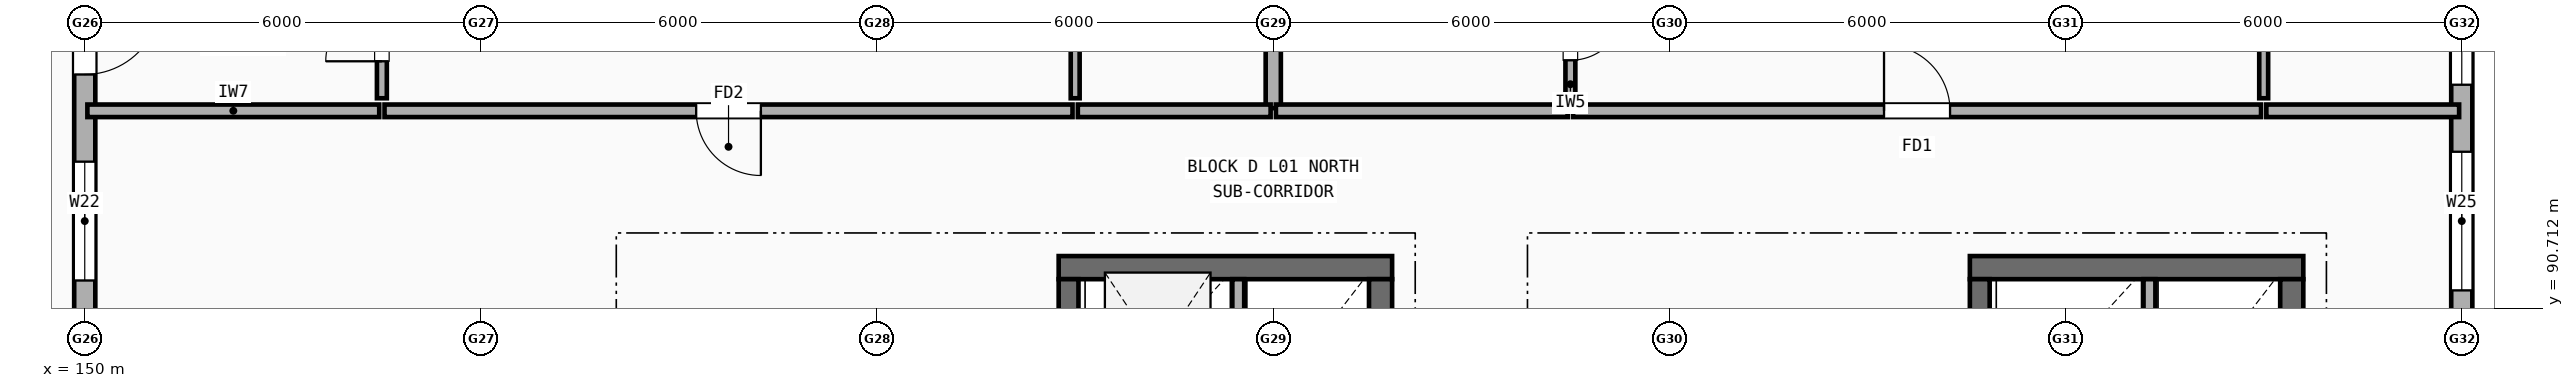
"""IFC4 building model, lengths in metres.
Left out: names, types, materials, properties, quantities, classifications, styles, units other than length and angle.
Written with IfcOpenShell. Run it as: python <this file> out.ifc"""

import sys

from ifc_helpers import new_model, si_unit, direction, frame, frame_2d, origin, place, context, subcontext, project, spatial, rectangle, extrude, element, fill, save


model = new_model("IFC4")
c1 = context("Model", 3, precision=1e-05, world=origin(), true_north=direction((0.0, 1.0)))
c2 = subcontext(c1, "Body", "Model", "MODEL_VIEW")
j1 = project(units=[si_unit("LENGTHUNIT", "METRE"), si_unit("PLANEANGLEUNIT", "RADIAN")], contexts=[c1])
p1 = place(None, origin())
s1 = spatial("IfcSite", under=j1, at=p1, CompositionType="ELEMENT")
p2 = place(p1, origin())
s2 = spatial("IfcBuilding", under=s1, at=p2, CompositionType="ELEMENT")
p3 = place(p2, frame((0.0, 0.0, 4.5)))
s3 = spatial("IfcBuildingStorey", under=s2, at=p3, CompositionType="ELEMENT", Elevation=4.5)
p4 = place(p3, frame((186.0, 90.4, 0.0), z_axis=(0.0, 0.0, 1.0), x_axis=(0.0, 1.0, 0.0)))
e1 = element("IfcWall", 1, at=p4, inside=s3, PredefinedType="STANDARD", context=c2, shape_type="SweptSolid", body=[
    extrude(rectangle(XDim=5.2, YDim=0.32, at=frame_2d((2.6, 0.0))), origin(), (0.0, 0.0, 1.0), 2.945),
])
p5 = place(p4, frame((0.58, 0.0, 0.9)))
e2 = element("IfcOpeningElement", 2, at=p5, cuts=e1, PredefinedType="OPENING", context=c2, shape_type="SweptSolid", body=[
    extrude(rectangle(XDim=2.1, YDim=1.55, at=frame_2d((1.05, 0.775))), frame((0.0, 0.17, 0.0), z_axis=(0.0, -1.0, 0.0), x_axis=(1.0, 0.0, 0.0)), (0.0, 0.0, 1.0), 0.34),
])
p6 = place(p4, frame((3.695, 0.0, 0.9)))
e3 = element("IfcOpeningElement", 3, at=p6, cuts=e1, PredefinedType="OPENING", context=c2, shape_type="SweptSolid", body=[
    extrude(rectangle(XDim=1.15, YDim=1.45, at=frame_2d((0.575, 0.725))), frame((0.0, 0.17, 0.0), z_axis=(0.0, -1.0, 0.0), x_axis=(1.0, 0.0, 0.0)), (0.0, 0.0, 1.0), 0.34),
])
p7 = place(p3, frame((150.0, 95.6, 0.0), z_axis=(0.0, 0.0, 1.0), x_axis=(0.0, -1.0, 0.0)))
e4 = element("IfcWall", 4, at=p7, inside=s3, PredefinedType="STANDARD", context=c2, shape_type="SweptSolid", body=[
    extrude(rectangle(XDim=5.2, YDim=0.32, at=frame_2d((2.6, 0.0))), origin(), (0.0, 0.0, 1.0), 2.945),
])
p8 = place(p7, frame((0.2, 0.0, 0.0)))
e5 = element("IfcOpeningElement", 5, at=p8, cuts=e4, PredefinedType="OPENING", context=c2, shape_type="SweptSolid", body=[
    extrude(rectangle(XDim=1.15, YDim=2.15, at=frame_2d((0.575, 1.075))), frame((0.0, 0.17, 0.0), z_axis=(0.0, -1.0, 0.0), x_axis=(1.0, 0.0, 0.0)), (0.0, 0.0, 1.0), 0.34),
])
p9 = place(p7, frame((2.67, 0.0, 0.9)))
e6 = element("IfcOpeningElement", 6, at=p9, cuts=e4, PredefinedType="OPENING", context=c2, shape_type="SweptSolid", body=[
    extrude(rectangle(XDim=1.8, YDim=1.45, at=frame_2d((0.9, 0.725))), frame((0.0, 0.17, 0.0), z_axis=(0.0, -1.0, 0.0), x_axis=(1.0, 0.0, 0.0)), (0.0, 0.0, 1.0), 0.34),
])
p10 = place(p3, frame((169.8, 91.325, 0.0), z_axis=(0.0, 0.0, 1.0), x_axis=(-1.0, 0.0, 0.0)))
e7 = element("IfcWall", 7, at=p10, inside=s3, PredefinedType="SHEAR", context=c2, shape_type="SweptSolid", body=[
    extrude(rectangle(XDim=5.05, YDim=0.35, at=frame_2d((2.525, 0.0))), origin(), (0.0, 0.0, 1.0), 2.945),
])
p11 = place(p3, frame((169.625, 84.75, 0.0), z_axis=(0.0, 0.0, 1.0), x_axis=(0.0, 1.0, 0.0)))
e8 = element("IfcWall", 8, at=p11, inside=s3, PredefinedType="SHEAR", context=c2, shape_type="SweptSolid", body=[
    extrude(rectangle(XDim=6.4, YDim=0.35, at=frame_2d((3.2, 0.0))), origin(), (0.0, 0.0, 1.0), 2.945),
])
p12 = place(p3, frame((164.9, 87.8, 0.0), z_axis=(0.0, 0.0, 1.0), x_axis=(0.0, 1.0, 0.0)))
e9 = element("IfcWall", 9, at=p12, inside=s3, PredefinedType="SHEAR", context=c2, shape_type="SweptSolid", body=[
    extrude(rectangle(XDim=3.35, YDim=0.3, at=frame_2d((1.675, 0.0))), origin(), (0.0, 0.0, 1.0), 2.945),
])
p13 = place(p3, frame((167.47, 88.94, 0.0), z_axis=(0.0, 0.0, 1.0), x_axis=(0.0, 1.0, 0.0)))
e10 = element("IfcWall", 10, at=p13, inside=s3, PredefinedType="SOLIDWALL", context=c2, shape_type="SweptSolid", body=[
    extrude(rectangle(XDim=2.21, YDim=0.18, at=frame_2d((1.105, 0.0))), origin(), (0.0, 0.0, 1.0), 2.945),
])
p14 = place(p3, frame((183.6, 91.325, 0.0), z_axis=(0.0, 0.0, 1.0), x_axis=(-1.0, 0.0, 0.0)))
e11 = element("IfcWall", 11, at=p14, inside=s3, PredefinedType="SHEAR", context=c2, shape_type="SweptSolid", body=[
    extrude(rectangle(XDim=5.05, YDim=0.35, at=frame_2d((2.525, 0.0))), origin(), (0.0, 0.0, 1.0), 2.945),
])
p15 = place(p3, frame((183.425, 84.75, 0.0), z_axis=(0.0, 0.0, 1.0), x_axis=(0.0, 1.0, 0.0)))
e12 = element("IfcWall", 12, at=p15, inside=s3, PredefinedType="SHEAR", context=c2, shape_type="SweptSolid", body=[
    extrude(rectangle(XDim=6.4, YDim=0.35, at=frame_2d((3.2, 0.0))), origin(), (0.0, 0.0, 1.0), 2.945),
])
p16 = place(p3, frame((178.7, 87.7, 0.0), z_axis=(0.0, 0.0, 1.0), x_axis=(0.0, 1.0, 0.0)))
e13 = element("IfcWall", 13, at=p16, inside=s3, PredefinedType="SHEAR", context=c2, shape_type="SweptSolid", body=[
    extrude(rectangle(XDim=3.45, YDim=0.3, at=frame_2d((1.725, 0.0))), origin(), (0.0, 0.0, 1.0), 2.945),
])
p17 = place(p3, frame((181.27, 88.94, 0.0), z_axis=(0.0, 0.0, 1.0), x_axis=(0.0, 1.0, 0.0)))
e14 = element("IfcWall", 14, at=p17, inside=s3, PredefinedType="SOLIDWALL", context=c2, shape_type="SweptSolid", body=[
    extrude(rectangle(XDim=2.21, YDim=0.18, at=frame_2d((1.105, 0.0))), origin(), (0.0, 0.0, 1.0), 2.945),
])
p18 = place(p3, frame((168.0, 93.74, 0.0), z_axis=(0.0, 0.0, 1.0), x_axis=(0.0, 1.0, 0.0)))
e15 = element("IfcWall", 15, at=p18, inside=s3, PredefinedType="SOLIDWALL", context=c2, shape_type="SweptSolid", body=[
    extrude(rectangle(XDim=13.87, YDim=0.23, at=frame_2d((6.935, 0.0))), origin(), (0.0, 0.0, 1.0), 2.945),
])
p19 = place(p3, frame((150.04, 93.7, 0.0), z_axis=(0.0, 0.0, 1.0), x_axis=(1.0, 0.0, 0.0)))
e16 = element("IfcWall", 16, at=p19, inside=s3, PredefinedType="SOLIDWALL", context=c2, shape_type="SweptSolid", body=[
    extrude(rectangle(XDim=4.42, YDim=0.19, at=frame_2d((2.21, 0.0))), origin(), (0.0, 0.0, 1.0), 2.945),
])
p20 = place(p3, frame((154.54, 93.7, 0.0), z_axis=(0.0, 0.0, 1.0), x_axis=(1.0, 0.0, 0.0)))
e17 = element("IfcWall", 17, at=p20, inside=s3, PredefinedType="SOLIDWALL", context=c2, shape_type="SweptSolid", body=[
    extrude(rectangle(XDim=10.42, YDim=0.19, at=frame_2d((5.21, 0.0))), origin(), (0.0, 0.0, 1.0), 2.945),
])
p21 = place(p20, frame((4.72, 0.0, 0.0)))
e18 = element("IfcOpeningElement", 18, at=p21, cuts=e17, PredefinedType="OPENING", context=c2, shape_type="SweptSolid", body=[
    extrude(rectangle(XDim=0.98, YDim=2.15, at=frame_2d((0.49, 1.075))), frame((0.0, 0.105, 0.0), z_axis=(0.0, -1.0, 0.0), x_axis=(1.0, 0.0, 0.0)), (0.0, 0.0, 1.0), 0.21),
])
p22 = place(p3, frame((154.5, 93.89, 0.0), z_axis=(0.0, 0.0, 1.0), x_axis=(0.0, 1.0, 0.0)))
e19 = element("IfcWall", 19, at=p22, inside=s3, PredefinedType="PARTITIONING", context=c2, shape_type="SweptSolid", body=[
    extrude(rectangle(XDim=1.97, YDim=0.15, at=frame_2d((0.985, 0.0))), origin(), (0.0, 0.0, 1.0), 2.945),
])
p23 = place(p22, frame((0.56, 0.0, 0.0)))
e20 = element("IfcOpeningElement", 20, at=p23, cuts=e19, PredefinedType="OPENING", context=c2, shape_type="SweptSolid", body=[
    extrude(rectangle(XDim=0.85, YDim=2.1, at=frame_2d((0.425, 1.05))), frame((0.0, 0.085, 0.0), z_axis=(0.0, -1.0, 0.0), x_axis=(1.0, 0.0, 0.0)), (0.0, 0.0, 1.0), 0.17),
])
p24 = place(p3, frame((165.04, 93.7, 0.0), z_axis=(0.0, 0.0, 1.0), x_axis=(1.0, 0.0, 0.0)))
e21 = element("IfcWall", 21, at=p24, inside=s3, PredefinedType="SOLIDWALL", context=c2, shape_type="SweptSolid", body=[
    extrude(rectangle(XDim=2.92, YDim=0.19, at=frame_2d((1.46, 0.0))), origin(), (0.0, 0.0, 1.0), 2.945),
])
p25 = place(p3, frame((165.0, 93.89, 0.0), z_axis=(0.0, 0.0, 1.0), x_axis=(0.0, 1.0, 0.0)))
e22 = element("IfcWall", 22, at=p25, inside=s3, PredefinedType="PARTITIONING", context=c2, shape_type="SweptSolid", body=[
    extrude(rectangle(XDim=13.92, YDim=0.135, at=frame_2d((6.96, 0.0))), origin(), (0.0, 0.0, 1.0), 2.458),
])
p26 = place(p25, frame((6.65, 0.0, 0.0)))
e23 = element("IfcOpeningElement", 23, at=p26, cuts=e22, PredefinedType="OPENING", context=c2, shape_type="SweptSolid", body=[
    extrude(rectangle(XDim=0.9, YDim=2.1, at=frame_2d((0.45, 1.05))), frame((0.0, 0.077, 0.0), z_axis=(0.0, -1.0, 0.0), x_axis=(1.0, 0.0, 0.0)), (0.0, 0.0, 1.0), 0.155),
])
p27 = place(p3, frame((168.04, 93.7, 0.0), z_axis=(0.0, 0.0, 1.0), x_axis=(1.0, 0.0, 0.0)))
e24 = element("IfcWall", 24, at=p27, inside=s3, PredefinedType="SOLIDWALL", context=c2, shape_type="SweptSolid", body=[
    extrude(rectangle(XDim=4.42, YDim=0.19, at=frame_2d((2.21, 0.0))), origin(), (0.0, 0.0, 1.0), 2.945),
])
p28 = place(p3, frame((172.54, 93.7, 0.0), z_axis=(0.0, 0.0, 1.0), x_axis=(1.0, 0.0, 0.0)))
e25 = element("IfcWall", 25, at=p28, inside=s3, PredefinedType="SOLIDWALL", context=c2, shape_type="SweptSolid", body=[
    extrude(rectangle(XDim=10.42, YDim=0.19, at=frame_2d((5.21, 0.0))), origin(), (0.0, 0.0, 1.0), 2.945),
])
p29 = place(p28, frame((4.71, 0.0, 0.0)))
e26 = element("IfcOpeningElement", 26, at=p29, cuts=e25, PredefinedType="OPENING", context=c2, shape_type="SweptSolid", body=[
    extrude(rectangle(XDim=1.0, YDim=2.15, at=frame_2d((0.5, 1.075))), frame((0.0, 0.105, 0.0), z_axis=(0.0, -1.0, 0.0), x_axis=(1.0, 0.0, 0.0)), (0.0, 0.0, 1.0), 0.21),
])
p30 = place(p3, frame((172.5, 93.89, 0.0), z_axis=(0.0, 0.0, 1.0), x_axis=(0.0, 1.0, 0.0)))
e27 = element("IfcWall", 27, at=p30, inside=s3, PredefinedType="PARTITIONING", context=c2, shape_type="SweptSolid", body=[
    extrude(rectangle(XDim=1.97, YDim=0.15, at=frame_2d((0.985, 0.0))), origin(), (0.0, 0.0, 1.0), 2.945),
])
p31 = place(p30, frame((0.575, 0.0, 0.0)))
e28 = element("IfcOpeningElement", 28, at=p31, cuts=e27, PredefinedType="OPENING", context=c2, shape_type="SweptSolid", body=[
    extrude(rectangle(XDim=0.82, YDim=2.08, at=frame_2d((0.41, 1.04))), frame((0.0, 0.085, 0.0), z_axis=(0.0, -1.0, 0.0), x_axis=(1.0, 0.0, 0.0)), (0.0, 0.0, 1.0), 0.17),
])
p32 = place(p3, frame((183.04, 93.7, 0.0), z_axis=(0.0, 0.0, 1.0), x_axis=(1.0, 0.0, 0.0)))
e29 = element("IfcWall", 29, at=p32, inside=s3, PredefinedType="SOLIDWALL", context=c2, shape_type="SweptSolid", body=[
    extrude(rectangle(XDim=2.92, YDim=0.19, at=frame_2d((1.46, 0.0))), origin(), (0.0, 0.0, 1.0), 2.945),
])
p33 = place(p3, frame((183.0, 93.89, 0.0), z_axis=(0.0, 0.0, 1.0), x_axis=(0.0, 1.0, 0.0)))
e30 = element("IfcWall", 30, at=p33, inside=s3, PredefinedType="PARTITIONING", context=c2, shape_type="SweptSolid", body=[
    extrude(rectangle(XDim=13.92, YDim=0.135, at=frame_2d((6.96, 0.0))), origin(), (0.0, 0.0, 1.0), 2.548),
])
p34 = place(p33, frame((6.65, 0.0, 0.0)))
e31 = element("IfcOpeningElement", 31, at=p34, cuts=e30, PredefinedType="OPENING", context=c2, shape_type="SweptSolid", body=[
    extrude(rectangle(XDim=0.88, YDim=2.1, at=frame_2d((0.44, 1.05))), frame((0.0, 0.077, 0.0), z_axis=(0.0, -1.0, 0.0), x_axis=(1.0, 0.0, 0.0)), (0.0, 0.0, 1.0), 0.155),
])
p35 = place(p5, origin())
e32 = element("IfcWindow", 32, at=p35, inside=s3, PartitioningType="SINGLE_PANEL", PredefinedType="WINDOW", context=c2, shape_type="SweptSolid", body=[
    extrude(rectangle(XDim=2.1, YDim=1.55, at=frame_2d((1.05, 0.775))), frame((0.0, 0.03, 0.0), z_axis=(0.0, -1.0, 0.0), x_axis=(1.0, 0.0, 0.0)), (0.0, 0.0, 1.0), 0.06),
])
fill(e2, e32)
p36 = place(p6, origin())
e33 = element("IfcWindow", 33, at=p36, inside=s3, PartitioningType="SINGLE_PANEL", PredefinedType="WINDOW", context=c2, shape_type="SweptSolid", body=[
    extrude(rectangle(XDim=1.15, YDim=1.45, at=frame_2d((0.575, 0.725))), frame((0.0, 0.03, 0.0), z_axis=(0.0, -1.0, 0.0), x_axis=(1.0, 0.0, 0.0)), (0.0, 0.0, 1.0), 0.06),
])
fill(e3, e33)
p37 = place(p8, frame((1.15, 0.0, 0.0), z_axis=(0.0, 0.0, 1.0), x_axis=(-1.0, 0.0, 0.0)))
e34 = element("IfcDoor", 34, at=p37, inside=s3, OperationType="SINGLE_SWING_LEFT", PredefinedType="DOOR", context=c2, shape_type="SweptSolid", body=[
    extrude(rectangle(XDim=1.15, YDim=2.15, at=frame_2d((0.575, 1.075))), frame((0.0, 0.025, 0.0), z_axis=(0.0, -1.0, 0.0), x_axis=(1.0, 0.0, 0.0)), (0.0, 0.0, 1.0), 0.05),
])
fill(e5, e34)
p38 = place(p9, origin())
e35 = element("IfcWindow", 35, at=p38, inside=s3, PartitioningType="SINGLE_PANEL", PredefinedType="WINDOW", context=c2, shape_type="SweptSolid", body=[
    extrude(rectangle(XDim=1.8, YDim=1.45, at=frame_2d((0.9, 0.725))), frame((0.0, 0.03, 0.0), z_axis=(0.0, -1.0, 0.0), x_axis=(1.0, 0.0, 0.0)), (0.0, 0.0, 1.0), 0.06),
])
fill(e6, e35)
p39 = place(p21, origin())
e36 = element("IfcDoor", 36, at=p39, inside=s3, OperationType="SINGLE_SWING_RIGHT", PredefinedType="DOOR", context=c2, shape_type="SweptSolid", body=[
    extrude(rectangle(XDim=0.98, YDim=2.15, at=frame_2d((0.49, 1.075))), frame((0.0, 0.025, 0.0), z_axis=(0.0, -1.0, 0.0), x_axis=(1.0, 0.0, 0.0)), (0.0, 0.0, 1.0), 0.05),
])
fill(e18, e36)
p40 = place(p23, origin())
e37 = element("IfcDoor", 37, at=p40, inside=s3, OperationType="SINGLE_SWING_LEFT", PredefinedType="DOOR", context=c2, shape_type="SweptSolid", body=[
    extrude(rectangle(XDim=0.85, YDim=2.1, at=frame_2d((0.425, 1.05))), frame((0.0, 0.025, 0.0), z_axis=(0.0, -1.0, 0.0), x_axis=(1.0, 0.0, 0.0)), (0.0, 0.0, 1.0), 0.05),
])
fill(e20, e37)
p41 = place(p29, origin())
e38 = element("IfcDoor", 38, at=p41, inside=s3, OperationType="SINGLE_SWING_LEFT", PredefinedType="DOOR", context=c2, shape_type="SweptSolid", body=[
    extrude(rectangle(XDim=1.0, YDim=2.15, at=frame_2d((0.5, 1.075))), frame((0.0, 0.025, 0.0), z_axis=(0.0, -1.0, 0.0), x_axis=(1.0, 0.0, 0.0)), (0.0, 0.0, 1.0), 0.05),
])
fill(e26, e38)
p42 = place(p31, origin())
e39 = element("IfcDoor", 39, at=p42, inside=s3, OperationType="SINGLE_SWING_RIGHT", PredefinedType="DOOR", context=c2, shape_type="SweptSolid", body=[
    extrude(rectangle(XDim=0.82, YDim=2.08, at=frame_2d((0.41, 1.04))), frame((0.0, 0.025, 0.0), z_axis=(0.0, -1.0, 0.0), x_axis=(1.0, 0.0, 0.0)), (0.0, 0.0, 1.0), 0.05),
])
fill(e28, e39)
save(model, sys.argv[1])
